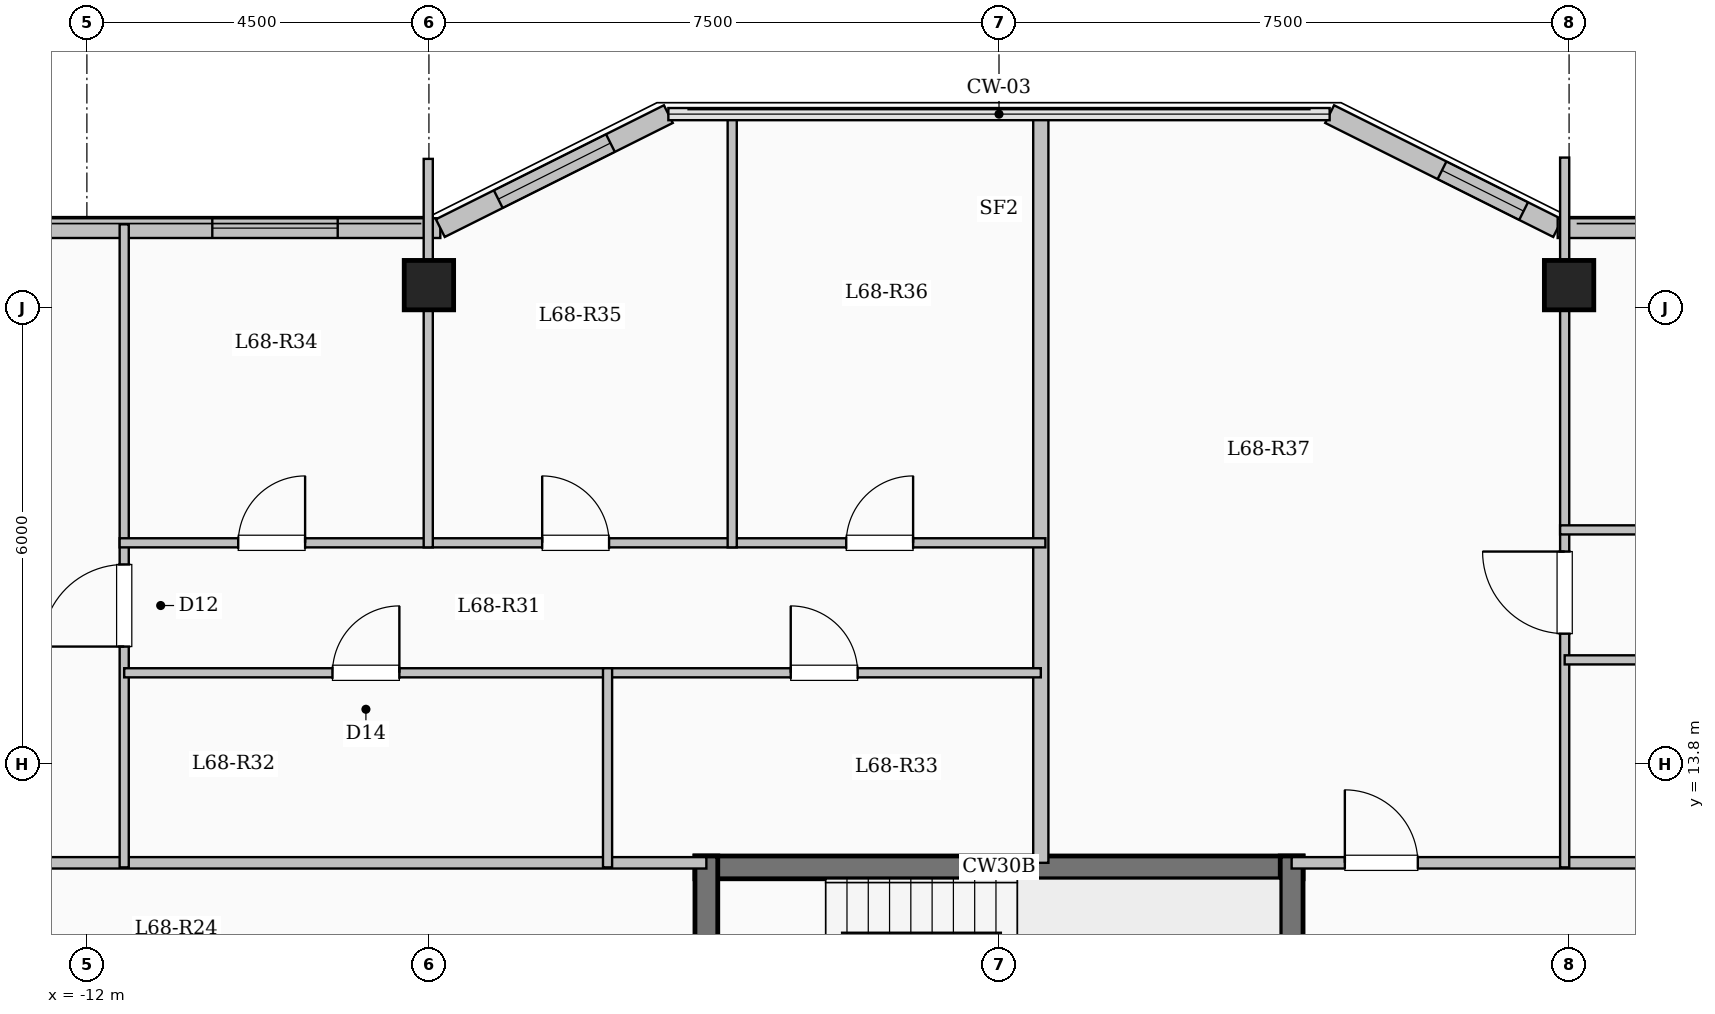
"""IFC4 building model, lengths in metres.
Left out: names, types, materials, properties, quantities, classifications, styles, units other than length and angle.
Written with IfcOpenShell. Run it as: python <this file> out.ifc"""

import sys

from ifc_helpers import new_model, si_unit, direction, frame, frame_2d, origin, origin_2d, place, context, subcontext, project, spatial, rectangle, extrude, element, fill, save


model = new_model("IFC4")
c1 = context("Model", 3, precision=1e-05, world=origin(), true_north=direction((0.0, 1.0)))
c2 = subcontext(c1, "Body", "Model", "MODEL_VIEW")
j1 = project(units=[si_unit("LENGTHUNIT", "METRE"), si_unit("PLANEANGLEUNIT", "RADIAN")], contexts=[c1])
p1 = place(None, origin())
s1 = spatial("IfcSite", under=j1, at=p1, CompositionType="ELEMENT")
p2 = place(p1, origin())
s2 = spatial("IfcBuilding", under=s1, at=p2, CompositionType="ELEMENT")
p3 = place(p2, frame((0.0, 0.0, 251.55)))
s3 = spatial("IfcBuildingStorey", under=s2, at=p3, CompositionType="ELEMENT", Elevation=251.55)
for number, where, z_axis, x_axis in (
    (1, (-7.5, 20.1, 0.0), (0.0, 0.0, 1.0), (1.0, 0.0, 0.0)),
    (2, (7.5, 20.1, 0.0), (0.0, 0.0, 1.0), (1.0, 0.0, 0.0)),
):
    element("IfcColumn", number, at=place(p3, frame(where, z_axis=z_axis, x_axis=x_axis)), inside=s3, PredefinedType="COLUMN", context=c2, shape_type="SweptSolid", body=[
        extrude(rectangle(XDim=0.65, YDim=0.65, at=origin_2d()), origin(), (0.0, 0.0, 1.0), 3.35),
    ])
p4 = place(p3, frame((-17.85, 20.85, 0.0), z_axis=(0.0, 0.0, 1.0), x_axis=(1.0, 0.0, 0.0)))
e3 = element("IfcWall", 3, at=p4, inside=s3, PredefinedType="SOLIDWALL", context=c2, shape_type="SweptSolid", body=[
    extrude(rectangle(XDim=10.5, YDim=0.26, at=frame_2d((5.25, 0.0))), origin(), (0.0, 0.0, 1.0), 3.1),
])
p5 = place(p4, frame((2.1, 0.0, 0.9)))
e4 = element("IfcOpeningElement", 4, at=p5, cuts=e3, PredefinedType="OPENING", context=c2, shape_type="SweptSolid", body=[
    extrude(rectangle(XDim=2.2, YDim=1.75, at=frame_2d((1.1, 0.875))), frame((0.0, 0.14, 0.0), z_axis=(0.0, -1.0, 0.0), x_axis=(1.0, 0.0, 0.0)), (0.0, 0.0, 1.0), 0.28),
])
p6 = place(p4, frame((7.5, 0.0, 0.9)))
e5 = element("IfcOpeningElement", 5, at=p6, cuts=e3, PredefinedType="OPENING", context=c2, shape_type="SweptSolid", body=[
    extrude(rectangle(XDim=1.65, YDim=1.6, at=frame_2d((0.825, 0.8))), frame((0.0, 0.14, 0.0), z_axis=(0.0, -1.0, 0.0), x_axis=(1.0, 0.0, 0.0)), (0.0, 0.0, 1.0), 0.28),
])
p7 = place(p3, frame((-7.35, 20.85, 0.0), z_axis=(0.0, 0.0, 1.0), x_axis=(0.894427191, 0.4472135955, 0.0)))
e6 = element("IfcWall", 6, at=p7, inside=s3, PredefinedType="SOLIDWALL", context=c2, shape_type="SweptSolid", body=[
    extrude(rectangle(XDim=3.354, YDim=0.26, at=frame_2d((1.677, 0.0))), origin(), (0.0, 0.0, 1.0), 3.1),
])
p8 = place(p7, frame((0.852, 0.0, 0.9)))
e7 = element("IfcOpeningElement", 7, at=p8, cuts=e6, PredefinedType="OPENING", context=c2, shape_type="SweptSolid", body=[
    extrude(rectangle(XDim=1.65, YDim=1.6, at=frame_2d((0.825, 0.8))), frame((0.0, 0.14, 0.0), z_axis=(0.0, -1.0, 0.0), x_axis=(1.0, 0.0, 0.0)), (0.0, 0.0, 1.0), 0.28),
])
p9 = place(p3, frame((4.35, 22.35, 0.0), z_axis=(0.0, 0.0, 1.0), x_axis=(0.894427191, -0.4472135955, 0.0)))
e8 = element("IfcWall", 8, at=p9, inside=s3, PredefinedType="SOLIDWALL", context=c2, shape_type="SweptSolid", body=[
    extrude(rectangle(XDim=3.354, YDim=0.26, at=frame_2d((1.677, 0.0))), origin(), (0.0, 0.0, 1.0), 3.1),
])
p10 = place(p9, frame((1.653, 0.0, 0.95)))
e9 = element("IfcOpeningElement", 9, at=p10, cuts=e8, PredefinedType="OPENING", context=c2, shape_type="SweptSolid", body=[
    extrude(rectangle(XDim=1.2, YDim=1.5, at=frame_2d((0.6, 0.75))), frame((0.0, 0.14, 0.0), z_axis=(0.0, -1.0, 0.0), x_axis=(1.0, 0.0, 0.0)), (0.0, 0.0, 1.0), 0.28),
])
p11 = place(p3, frame((7.35, 20.85, 0.0), z_axis=(0.0, 0.0, 1.0), x_axis=(1.0, 0.0, 0.0)))
e10 = element("IfcWall", 10, at=p11, inside=s3, PredefinedType="SOLIDWALL", context=c2, shape_type="SweptSolid", body=[
    extrude(rectangle(XDim=10.5, YDim=0.26, at=frame_2d((5.25, 0.0))), origin(), (0.0, 0.0, 1.0), 3.1),
])
p12 = place(p11, frame((1.825, 0.0, 0.9)))
e11 = element("IfcOpeningElement", 11, at=p12, cuts=e10, PredefinedType="OPENING", context=c2, shape_type="SweptSolid", body=[
    extrude(rectangle(XDim=1.65, YDim=1.6, at=frame_2d((0.825, 0.8))), frame((0.0, 0.14, 0.0), z_axis=(0.0, -1.0, 0.0), x_axis=(1.0, 0.0, 0.0)), (0.0, 0.0, 1.0), 0.28),
])
p13 = place(p11, frame((7.0, 0.0, 0.9)))
e12 = element("IfcOpeningElement", 12, at=p13, cuts=e10, PredefinedType="OPENING", context=c2, shape_type="SweptSolid", body=[
    extrude(rectangle(XDim=1.65, YDim=1.6, at=frame_2d((0.825, 0.8))), frame((0.0, 0.14, 0.0), z_axis=(0.0, -1.0, 0.0), x_axis=(1.0, 0.0, 0.0)), (0.0, 0.0, 1.0), 0.28),
])
p14 = place(p3, frame((-4.0, 12.44, 0.0), z_axis=(0.0, 0.0, 1.0), x_axis=(1.0, 0.0, 0.0)))
e13 = element("IfcWall", 13, at=p14, inside=s3, PredefinedType="SHEAR", context=c2, shape_type="SweptSolid", body=[
    extrude(rectangle(XDim=8.0, YDim=0.3, at=frame_2d((4.0, 0.0))), origin(), (0.0, 0.0, 1.0), 3.35),
])
for number, where, z_axis, x_axis in (
    (14, (-3.85, 9.0, 0.0), (0.0, 0.0, 1.0), (0.0, 1.0, 0.0)),
    (15, (3.85, 9.0, 0.0), (0.0, 0.0, 1.0), (0.0, 1.0, 0.0)),
):
    element("IfcWall", number, at=place(p3, frame(where, z_axis=z_axis, x_axis=x_axis)), inside=s3, PredefinedType="SHEAR", context=c2, shape_type="SweptSolid", body=[
        extrude(rectangle(XDim=3.59, YDim=0.3, at=frame_2d((1.795, 0.0))), origin(), (0.0, 0.0, 1.0), 3.35),
    ])
p15 = place(p3, frame((-17.75, 12.5, 0.0), z_axis=(0.0, 0.0, 1.0), x_axis=(1.0, 0.0, 0.0)))
e16 = element("IfcWall", 16, at=p15, inside=s3, PredefinedType="PARTITIONING", context=c2, shape_type="SweptSolid", body=[
    extrude(rectangle(XDim=13.9, YDim=0.15, at=frame_2d((6.95, 0.0))), origin(), (0.0, 0.0, 1.0), 3.1),
])
p16 = place(p15, frame((0.7, 0.0, 0.0)))
e17 = element("IfcOpeningElement", 17, at=p16, cuts=e16, PredefinedType="OPENING", context=c2, shape_type="SweptSolid", body=[
    extrude(rectangle(XDim=0.96, YDim=2.15, at=frame_2d((0.48, 1.075))), frame((0.0, 0.085, 0.0), z_axis=(0.0, -1.0, 0.0), x_axis=(1.0, 0.0, 0.0)), (0.0, 0.0, 1.0), 0.17),
])
p17 = place(p3, frame((3.85, 12.5, 0.0), z_axis=(0.0, 0.0, 1.0), x_axis=(1.0, 0.0, 0.0)))
e18 = element("IfcWall", 18, at=p17, inside=s3, PredefinedType="PARTITIONING", context=c2, shape_type="SweptSolid", body=[
    extrude(rectangle(XDim=13.9, YDim=0.15, at=frame_2d((6.95, 0.0))), origin(), (0.0, 0.0, 1.0), 3.1),
])
p18 = place(p17, frame((0.7, 0.0, 0.0)))
e19 = element("IfcOpeningElement", 19, at=p18, cuts=e18, PredefinedType="OPENING", context=c2, shape_type="SweptSolid", body=[
    extrude(rectangle(XDim=0.96, YDim=2.15, at=frame_2d((0.48, 1.075))), frame((0.0, 0.085, 0.0), z_axis=(0.0, -1.0, 0.0), x_axis=(1.0, 0.0, 0.0)), (0.0, 0.0, 1.0), 0.17),
])
p19 = place(p3, frame((0.55, 12.5, 0.0), z_axis=(0.0, 0.0, 1.0), x_axis=(0.0, 1.0, 0.0)))
e20 = element("IfcWall", 20, at=p19, inside=s3, PredefinedType="SOLIDWALL", context=c2, shape_type="SweptSolid", body=[
    extrude(rectangle(XDim=9.88, YDim=0.2, at=frame_2d((4.94, 0.0))), origin(), (0.0, 0.0, 1.0), 3.1),
])
p20 = place(p3, frame((-11.509, 12.44, 0.0), z_axis=(0.0, 0.0, 1.0), x_axis=(0.0, 1.0, 0.0)))
e21 = element("IfcWall", 21, at=p20, inside=s3, PredefinedType="PARTITIONING", context=c2, shape_type="SweptSolid", body=[
    extrude(rectangle(XDim=8.46, YDim=0.12, at=frame_2d((4.23, 0.0))), origin(), (0.0, 0.0, 1.0), 3.1),
])
p21 = place(p20, frame((2.905, 0.0, 0.0)))
e22 = element("IfcOpeningElement", 22, at=p21, cuts=e21, PredefinedType="OPENING", context=c2, shape_type="SweptSolid", body=[
    extrude(rectangle(XDim=1.08, YDim=2.15, at=frame_2d((0.54, 1.075))), frame((0.0, 0.07, 0.0), z_axis=(0.0, -1.0, 0.0), x_axis=(1.0, 0.0, 0.0)), (0.0, 0.0, 1.0), 0.14),
])
p22 = place(p3, frame((-11.509, 15.0, 0.0), z_axis=(0.0, 0.0, 1.0), x_axis=(1.0, 0.0, 0.0)))
e23 = element("IfcWall", 23, at=p22, inside=s3, PredefinedType="PARTITIONING", context=c2, shape_type="SweptSolid", body=[
    extrude(rectangle(XDim=6.359, YDim=0.12, at=frame_2d((3.18, 0.0))), origin(), (0.0, 0.0, 1.0), 3.1),
])
p23 = place(p22, frame((2.74, 0.0, 0.0)))
e24 = element("IfcOpeningElement", 24, at=p23, cuts=e23, PredefinedType="OPENING", context=c2, shape_type="SweptSolid", body=[
    extrude(rectangle(XDim=0.88, YDim=2.1, at=frame_2d((0.44, 1.05))), frame((0.0, 0.07, 0.0), z_axis=(0.0, -1.0, 0.0), x_axis=(1.0, 0.0, 0.0)), (0.0, 0.0, 1.0), 0.14),
])
p24 = place(p3, frame((-5.15, 15.0, 0.0), z_axis=(0.0, 0.0, 1.0), x_axis=(1.0, 0.0, 0.0)))
e25 = element("IfcWall", 25, at=p24, inside=s3, PredefinedType="PARTITIONING", context=c2, shape_type="SweptSolid", body=[
    extrude(rectangle(XDim=5.7, YDim=0.12, at=frame_2d((2.85, 0.0))), origin(), (0.0, 0.0, 1.0), 3.1),
])
p25 = place(p24, frame((2.41, 0.0, 0.0)))
e26 = element("IfcOpeningElement", 26, at=p25, cuts=e25, PredefinedType="OPENING", context=c2, shape_type="SweptSolid", body=[
    extrude(rectangle(XDim=0.88, YDim=2.1, at=frame_2d((0.44, 1.05))), frame((0.0, 0.07, 0.0), z_axis=(0.0, -1.0, 0.0), x_axis=(1.0, 0.0, 0.0)), (0.0, 0.0, 1.0), 0.14),
])
p26 = place(p3, frame((-11.569, 16.71, 0.0), z_axis=(0.0, 0.0, 1.0), x_axis=(1.0, 0.0, 0.0)))
e27 = element("IfcWall", 27, at=p26, inside=s3, PredefinedType="PARTITIONING", context=c2, shape_type="SweptSolid", body=[
    extrude(rectangle(XDim=12.179, YDim=0.12, at=frame_2d((6.09, 0.0))), origin(), (0.0, 0.0, 1.0), 2.785),
])
p27 = place(p26, frame((1.56, 0.0, 0.0)))
e28 = element("IfcOpeningElement", 28, at=p27, cuts=e27, PredefinedType="OPENING", context=c2, shape_type="SweptSolid", body=[
    extrude(rectangle(XDim=0.88, YDim=2.1, at=frame_2d((0.44, 1.05))), frame((0.0, 0.07, 0.0), z_axis=(0.0, -1.0, 0.0), x_axis=(1.0, 0.0, 0.0)), (0.0, 0.0, 1.0), 0.14),
])
p28 = place(p26, frame((5.559, 0.0, 0.0)))
e29 = element("IfcOpeningElement", 29, at=p28, cuts=e27, PredefinedType="OPENING", context=c2, shape_type="SweptSolid", body=[
    extrude(rectangle(XDim=0.88, YDim=2.1, at=frame_2d((0.44, 1.05))), frame((0.0, 0.07, 0.0), z_axis=(0.0, -1.0, 0.0), x_axis=(1.0, 0.0, 0.0)), (0.0, 0.0, 1.0), 0.14),
])
p29 = place(p26, frame((9.559, 0.0, 0.0)))
e30 = element("IfcOpeningElement", 30, at=p29, cuts=e27, PredefinedType="OPENING", context=c2, shape_type="SweptSolid", body=[
    extrude(rectangle(XDim=0.88, YDim=2.1, at=frame_2d((0.44, 1.05))), frame((0.0, 0.07, 0.0), z_axis=(0.0, -1.0, 0.0), x_axis=(1.0, 0.0, 0.0)), (0.0, 0.0, 1.0), 0.14),
])
p30 = place(p3, frame((-5.15, 12.44, 0.0), z_axis=(0.0, 0.0, 1.0), x_axis=(0.0, 1.0, 0.0)))
e31 = element("IfcWall", 31, at=p30, inside=s3, PredefinedType="PARTITIONING", context=c2, shape_type="SweptSolid", body=[
    extrude(rectangle(XDim=2.62, YDim=0.12, at=frame_2d((1.31, 0.0))), origin(), (0.0, 0.0, 1.0), 3.1),
])
p31 = place(p3, frame((-7.509, 16.65, 0.0), z_axis=(0.0, 0.0, 1.0), x_axis=(0.0, 1.0, 0.0)))
e32 = element("IfcWall", 32, at=p31, inside=s3, PredefinedType="PARTITIONING", context=c2, shape_type="SweptSolid", body=[
    extrude(rectangle(XDim=5.111, YDim=0.12, at=frame_2d((2.556, 0.0))), origin(), (0.0, 0.0, 1.0), 2.685),
])
p32 = place(p3, frame((-3.51, 16.65, 0.0), z_axis=(0.0, 0.0, 1.0), x_axis=(0.0, 1.0, 0.0)))
e33 = element("IfcWall", 33, at=p32, inside=s3, PredefinedType="PARTITIONING", context=c2, shape_type="SweptSolid", body=[
    extrude(rectangle(XDim=5.73, YDim=0.12, at=frame_2d((2.865, 0.0))), origin(), (0.0, 0.0, 1.0), 3.1),
])
p33 = place(p3, frame((7.442, 12.44, 0.0), z_axis=(0.0, 0.0, 1.0), x_axis=(0.0, 1.0, 0.0)))
e34 = element("IfcWall", 34, at=p33, inside=s3, PredefinedType="PARTITIONING", context=c2, shape_type="SweptSolid", body=[
    extrude(rectangle(XDim=9.338, YDim=0.12, at=frame_2d((4.669, 0.0))), origin(), (0.0, 0.0, 1.0), 2.685),
])
p34 = place(p33, frame((3.075, 0.0, 0.0)))
e35 = element("IfcOpeningElement", 35, at=p34, cuts=e34, PredefinedType="OPENING", context=c2, shape_type="SweptSolid", body=[
    extrude(rectangle(XDim=1.08, YDim=2.15, at=frame_2d((0.54, 1.075))), frame((0.0, 0.07, 0.0), z_axis=(0.0, -1.0, 0.0), x_axis=(1.0, 0.0, 0.0)), (0.0, 0.0, 1.0), 0.14),
])
p35 = place(p3, frame((7.442, 15.17, 0.0), z_axis=(0.0, 0.0, 1.0), x_axis=(1.0, 0.0, 0.0)))
e36 = element("IfcWall", 36, at=p35, inside=s3, PredefinedType="PARTITIONING", context=c2, shape_type="SweptSolid", body=[
    extrude(rectangle(XDim=5.841, YDim=0.12, at=frame_2d((2.92, 0.0))), origin(), (0.0, 0.0, 1.0), 3.1),
])
p36 = place(p35, frame((2.48, 0.0, 0.0)))
e37 = element("IfcOpeningElement", 37, at=p36, cuts=e36, PredefinedType="OPENING", context=c2, shape_type="SweptSolid", body=[
    extrude(rectangle(XDim=0.88, YDim=2.1, at=frame_2d((0.44, 1.05))), frame((0.0, 0.07, 0.0), z_axis=(0.0, -1.0, 0.0), x_axis=(1.0, 0.0, 0.0)), (0.0, 0.0, 1.0), 0.14),
])
p37 = place(p3, frame((7.382, 16.88, 0.0), z_axis=(0.0, 0.0, 1.0), x_axis=(1.0, 0.0, 0.0)))
e38 = element("IfcWall", 38, at=p37, inside=s3, PredefinedType="PARTITIONING", context=c2, shape_type="SweptSolid", body=[
    extrude(rectangle(XDim=10.428, YDim=0.12, at=frame_2d((5.214, 0.0))), origin(), (0.0, 0.0, 1.0), 2.785),
])
p38 = place(p37, frame((2.122, 0.0, 0.0)))
e39 = element("IfcOpeningElement", 39, at=p38, cuts=e38, PredefinedType="OPENING", context=c2, shape_type="SweptSolid", body=[
    extrude(rectangle(XDim=0.88, YDim=2.1, at=frame_2d((0.44, 1.05))), frame((0.0, 0.07, 0.0), z_axis=(0.0, -1.0, 0.0), x_axis=(1.0, 0.0, 0.0)), (0.0, 0.0, 1.0), 0.14),
])
p39 = place(p37, frame((7.246, 0.0, 0.0)))
e40 = element("IfcOpeningElement", 40, at=p39, cuts=e38, PredefinedType="OPENING", context=c2, shape_type="SweptSolid", body=[
    extrude(rectangle(XDim=0.88, YDim=2.1, at=frame_2d((0.44, 1.05))), frame((0.0, 0.07, 0.0), z_axis=(0.0, -1.0, 0.0), x_axis=(1.0, 0.0, 0.0)), (0.0, 0.0, 1.0), 0.14),
])
p40 = place(p6, origin())
e41 = element("IfcWindow", 41, at=p40, inside=s3, PartitioningType="SINGLE_PANEL", PredefinedType="WINDOW", context=c2, shape_type="SweptSolid", body=[
    extrude(rectangle(XDim=1.65, YDim=1.6, at=frame_2d((0.825, 0.8))), frame((0.0, 0.03, 0.0), z_axis=(0.0, -1.0, 0.0), x_axis=(1.0, 0.0, 0.0)), (0.0, 0.0, 1.0), 0.06),
])
fill(e5, e41)
p41 = place(p8, origin())
e42 = element("IfcWindow", 42, at=p41, inside=s3, PartitioningType="SINGLE_PANEL", PredefinedType="WINDOW", context=c2, shape_type="SweptSolid", body=[
    extrude(rectangle(XDim=1.65, YDim=1.6, at=frame_2d((0.825, 0.8))), frame((0.0, 0.03, 0.0), z_axis=(0.0, -1.0, 0.0), x_axis=(1.0, 0.0, 0.0)), (0.0, 0.0, 1.0), 0.06),
])
fill(e7, e42)
p42 = place(p10, origin())
e43 = element("IfcWindow", 43, at=p42, inside=s3, PartitioningType="SINGLE_PANEL", PredefinedType="WINDOW", context=c2, shape_type="SweptSolid", body=[
    extrude(rectangle(XDim=1.2, YDim=1.5, at=frame_2d((0.6, 0.75))), frame((0.0, 0.03, 0.0), z_axis=(0.0, -1.0, 0.0), x_axis=(1.0, 0.0, 0.0)), (0.0, 0.0, 1.0), 0.06),
])
fill(e9, e43)
p43 = place(p21, origin())
e44 = element("IfcDoor", 44, at=p43, inside=s3, OperationType="SINGLE_SWING_LEFT", PredefinedType="DOOR", context=c2, shape_type="SweptSolid", body=[
    extrude(rectangle(XDim=1.08, YDim=2.15, at=frame_2d((0.54, 1.075))), frame((0.0, 0.025, 0.0), z_axis=(0.0, -1.0, 0.0), x_axis=(1.0, 0.0, 0.0)), (0.0, 0.0, 1.0), 0.05),
])
fill(e22, e44)
p44 = place(p23, origin())
e45 = element("IfcDoor", 45, at=p44, inside=s3, OperationType="SINGLE_SWING_RIGHT", PredefinedType="DOOR", context=c2, shape_type="SweptSolid", body=[
    extrude(rectangle(XDim=0.88, YDim=2.1, at=frame_2d((0.44, 1.05))), frame((0.0, 0.025, 0.0), z_axis=(0.0, -1.0, 0.0), x_axis=(1.0, 0.0, 0.0)), (0.0, 0.0, 1.0), 0.05),
])
fill(e24, e45)
p45 = place(p25, origin())
e46 = element("IfcDoor", 46, at=p45, inside=s3, OperationType="SINGLE_SWING_LEFT", PredefinedType="DOOR", context=c2, shape_type="SweptSolid", body=[
    extrude(rectangle(XDim=0.88, YDim=2.1, at=frame_2d((0.44, 1.05))), frame((0.0, 0.025, 0.0), z_axis=(0.0, -1.0, 0.0), x_axis=(1.0, 0.0, 0.0)), (0.0, 0.0, 1.0), 0.05),
])
fill(e26, e46)
p46 = place(p27, origin())
e47 = element("IfcDoor", 47, at=p46, inside=s3, OperationType="SINGLE_SWING_RIGHT", PredefinedType="DOOR", context=c2, shape_type="SweptSolid", body=[
    extrude(rectangle(XDim=0.88, YDim=2.1, at=frame_2d((0.44, 1.05))), frame((0.0, 0.025, 0.0), z_axis=(0.0, -1.0, 0.0), x_axis=(1.0, 0.0, 0.0)), (0.0, 0.0, 1.0), 0.05),
])
fill(e28, e47)
p47 = place(p28, origin())
e48 = element("IfcDoor", 48, at=p47, inside=s3, OperationType="SINGLE_SWING_LEFT", PredefinedType="DOOR", context=c2, shape_type="SweptSolid", body=[
    extrude(rectangle(XDim=0.88, YDim=2.1, at=frame_2d((0.44, 1.05))), frame((0.0, 0.025, 0.0), z_axis=(0.0, -1.0, 0.0), x_axis=(1.0, 0.0, 0.0)), (0.0, 0.0, 1.0), 0.05),
])
fill(e29, e48)
p48 = place(p29, origin())
e49 = element("IfcDoor", 49, at=p48, inside=s3, OperationType="SINGLE_SWING_RIGHT", PredefinedType="DOOR", context=c2, shape_type="SweptSolid", body=[
    extrude(rectangle(XDim=0.88, YDim=2.1, at=frame_2d((0.44, 1.05))), frame((0.0, 0.025, 0.0), z_axis=(0.0, -1.0, 0.0), x_axis=(1.0, 0.0, 0.0)), (0.0, 0.0, 1.0), 0.05),
])
fill(e30, e49)
p49 = place(p18, origin())
e50 = element("IfcDoor", 50, at=p49, inside=s3, OperationType="SINGLE_SWING_LEFT", PredefinedType="DOOR", context=c2, shape_type="SweptSolid", body=[
    extrude(rectangle(XDim=0.96, YDim=2.15, at=frame_2d((0.48, 1.075))), frame((0.0, 0.025, 0.0), z_axis=(0.0, -1.0, 0.0), x_axis=(1.0, 0.0, 0.0)), (0.0, 0.0, 1.0), 0.05),
])
fill(e19, e50)
p50 = place(p34, origin())
e51 = element("IfcDoor", 51, at=p50, inside=s3, OperationType="SINGLE_SWING_RIGHT", PredefinedType="DOOR", context=c2, shape_type="SweptSolid", body=[
    extrude(rectangle(XDim=1.08, YDim=2.15, at=frame_2d((0.54, 1.075))), frame((0.0, 0.025, 0.0), z_axis=(0.0, -1.0, 0.0), x_axis=(1.0, 0.0, 0.0)), (0.0, 0.0, 1.0), 0.05),
])
fill(e35, e51)
save(model, sys.argv[1])
